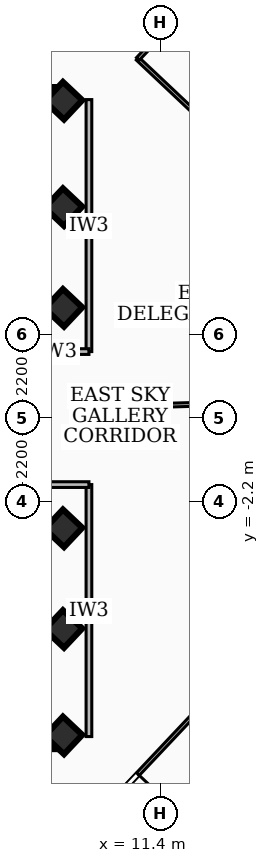
"""IFC4 building model, lengths in metres.
Left out: names, types, materials, properties, quantities, classifications, styles, units other than length and angle.
Written with IfcOpenShell. Run it as: python <this file> out.ifc"""

import sys

from ifc_helpers import new_model, si_unit, direction, frame, frame_2d, origin, origin_2d, place, context, subcontext, project, spatial, rectangle, extrude, element, fill, save


model = new_model("IFC4")
c1 = context("Model", 3, precision=1e-05, world=origin(), true_north=direction((0.0, 1.0)))
c2 = subcontext(c1, "Body", "Model", "MODEL_VIEW")
j1 = project(units=[si_unit("LENGTHUNIT", "METRE"), si_unit("PLANEANGLEUNIT", "RADIAN")], contexts=[c1])
p1 = place(None, origin())
s1 = spatial("IfcSite", under=j1, at=p1, CompositionType="ELEMENT")
p2 = place(p1, origin())
s2 = spatial("IfcBuilding", under=s1, at=p2, CompositionType="ELEMENT")
p3 = place(p2, frame((0.0, 0.0, 244.08)))
s3 = spatial("IfcBuildingStorey", under=s2, at=p3, CompositionType="ELEMENT", Elevation=244.08)
for number, where, z_axis, x_axis in (
    (1, (-8.78, 8.51, 0.0), (0.0, 0.0, 1.0), (1.0, 0.0, 0.0)),
    (2, (8.78, -8.51, 0.0), (0.0, 0.0, 1.0), (-1.0, 0.0, 0.0)),
):
    element("IfcWall", number, at=place(p3, frame(where, z_axis=z_axis, x_axis=x_axis)), inside=s3, PredefinedType="SHEAR", context=c2, shape_type="SweptSolid", body=[
        extrude(rectangle(XDim=17.56, YDim=0.4, at=frame_2d((8.78, 0.0))), origin(), (0.0, 0.0, 1.0), 3.16),
    ])
for number, where, z_axis, x_axis in (
    (3, (8.85, -5.55, 0.0), (0.0, 0.0, 1.0), (0.686, 0.728, 0.0)),
    (4, (8.85, -2.9, 0.0), (0.0, 0.0, 1.0), (0.686, 0.728, 0.0)),
    (5, (8.85, 2.9, 0.0), (0.0, 0.0, 1.0), (0.686, 0.728, 0.0)),
    (6, (8.85, 5.55, 0.0), (0.0, 0.0, 1.0), (0.686, 0.728, 0.0)),
    (7, (8.85, -8.35, 0.0), (0.0, 0.0, 1.0), (0.686, 0.728, 0.0)),
    (8, (8.85, 8.35, 0.0), (0.0, 0.0, 1.0), (0.686, 0.728, 0.0)),
):
    element("IfcColumn", number, at=place(p3, frame(where, z_axis=z_axis, x_axis=x_axis)), inside=s3, PredefinedType="COLUMN", context=c2, shape_type="SweptSolid", body=[
        extrude(rectangle(XDim=0.7, YDim=0.7, at=origin_2d()), origin(), (0.0, 0.0, 1.0), 3.42),
    ])
p4 = place(p3, frame((9.52, 1.75, 0.0), z_axis=(0.0, 0.0, 1.0), x_axis=(0.0, 1.0, 0.0)))
e9 = element("IfcWall", 9, at=p4, inside=s3, PredefinedType="PARTITIONING", context=c2, shape_type="SweptSolid", body=[
    extrude(rectangle(XDim=6.63, YDim=0.15, at=frame_2d((3.315, 0.0))), origin(), (0.0, 0.0, 1.0), 3.16),
])
p5 = place(p3, frame((7.85, 1.75, 0.0), z_axis=(0.0, 0.0, 1.0), x_axis=(1.0, 0.0, 0.0)))
e10 = element("IfcWall", 10, at=p5, inside=s3, PredefinedType="PARTITIONING", context=c2, shape_type="SweptSolid", body=[
    extrude(rectangle(XDim=1.67, YDim=0.15, at=frame_2d((0.835, 0.0))), origin(), (0.0, 0.0, 1.0), 2.39),
])
p6 = place(p3, frame((9.52, -8.38, 0.0), z_axis=(0.0, 0.0, 1.0), x_axis=(0.0, 1.0, 0.0)))
e11 = element("IfcWall", 11, at=p6, inside=s3, PredefinedType="PARTITIONING", context=c2, shape_type="SweptSolid", body=[
    extrude(rectangle(XDim=6.63, YDim=0.15, at=frame_2d((3.315, 0.0))), origin(), (0.0, 0.0, 1.0), 2.53),
])
p7 = place(p3, frame((7.85, -1.75, 0.0), z_axis=(0.0, 0.0, 1.0), x_axis=(1.0, 0.0, 0.0)))
e12 = element("IfcWall", 12, at=p7, inside=s3, PredefinedType="PARTITIONING", context=c2, shape_type="SweptSolid", body=[
    extrude(rectangle(XDim=1.67, YDim=0.15, at=frame_2d((0.835, 0.0))), origin(), (0.0, 0.0, 1.0), 2.39),
])
p8 = place(p3, frame((11.395, 0.334, 0.0), z_axis=(0.0, 0.0, 1.0), x_axis=(0.999571055306, 0.029286607775, 0.0)))
e13 = element("IfcWall", 13, at=p8, inside=s3, PredefinedType="PARTITIONING", context=c2, shape_type="SweptSolid", body=[
    extrude(rectangle(XDim=8.295, YDim=0.1, at=frame_2d((4.147, 0.0))), origin(), (0.0, 0.0, 1.0), 3.16),
])
p9 = place(p3, frame((16.585, 4.002, 0.0), z_axis=(0.0, 0.0, 1.0), x_axis=(-0.727485611578, 0.686122937196, 0.0)))
e14 = element("IfcWall", 14, at=p9, inside=s3, PredefinedType="PARTITIONING", context=c2, shape_type="SweptSolid", body=[
    extrude(rectangle(XDim=7.951, YDim=0.1, at=frame_2d((3.975, 0.0))), origin(), (0.0, 0.0, 1.0), 3.16),
])
p10 = place(p3, frame((10.808, 9.45, 0.0), z_axis=(0.0, 0.0, 1.0), x_axis=(0.686175284747, 0.727436236795, 0.0)))
e15 = element("IfcWall", 15, at=p10, inside=s3, PredefinedType="PARTITIONING", context=c2, shape_type="SweptSolid", body=[
    extrude(rectangle(XDim=2.16, YDim=0.1, at=frame_2d((1.08, 0.0))), origin(), (0.0, 0.0, 1.0), 3.16),
])
p11 = place(p10, frame((0.44, 0.0, 0.0)))
e16 = element("IfcOpeningElement", 16, at=p11, cuts=e15, PredefinedType="OPENING", context=c2, shape_type="SweptSolid", body=[
    extrude(rectangle(XDim=1.5, YDim=2.12, at=frame_2d((0.75, 1.06))), frame((0.0, 0.06, 0.0), z_axis=(0.0, -1.0, 0.0), x_axis=(1.0, 0.0, 0.0)), (0.0, 0.0, 1.0), 0.12),
])
p12 = place(p3, frame((6.75, 16.246, 0.0), z_axis=(0.0, 0.0, 1.0), x_axis=(0.727488049341, -0.686120352464, 0.0)))
e17 = element("IfcWall", 17, at=p12, inside=s3, PredefinedType="PARTITIONING", context=c2, shape_type="SweptSolid", body=[
    extrude(rectangle(XDim=12.47, YDim=0.1, at=frame_2d((6.235, 0.0))), origin(), (0.0, 0.0, 1.0), 2.53),
])
p13 = place(p12, frame((6.155, 0.0, 0.0)))
e18 = element("IfcOpeningElement", 18, at=p13, cuts=e17, PredefinedType="OPENING", context=c2, shape_type="SweptSolid", body=[
    extrude(rectangle(XDim=0.86, YDim=2.04, at=frame_2d((0.43, 1.02))), frame((0.0, 0.06, 0.0), z_axis=(0.0, -1.0, 0.0), x_axis=(1.0, 0.0, 0.0)), (0.0, 0.0, 1.0), 0.12),
])
p14 = place(p12, frame((4.955, 0.0, 0.0)))
e19 = element("IfcOpeningElement", 19, at=p14, cuts=e17, PredefinedType="OPENING", context=c2, shape_type="SweptSolid", body=[
    extrude(rectangle(XDim=0.86, YDim=2.04, at=frame_2d((0.43, 1.02))), frame((0.0, 0.06, 0.0), z_axis=(0.0, -1.0, 0.0), x_axis=(1.0, 0.0, 0.0)), (0.0, 0.0, 1.0), 0.12),
])
p15 = place(p3, frame((17.271, -2.514, 0.0), z_axis=(0.0, 0.0, 1.0), x_axis=(-0.686068145865, -0.727537283739, 0.0)))
e20 = element("IfcWall", 20, at=p15, inside=s3, PredefinedType="PARTITIONING", context=c2, shape_type="SweptSolid", body=[
    extrude(rectangle(XDim=20.04, YDim=0.1, at=frame_2d((10.02, 0.0))), origin(), (0.0, 0.0, 1.0), 2.53),
])
p16 = place(p15, frame((10.86, 0.0, 0.0)))
e21 = element("IfcOpeningElement", 21, at=p16, cuts=e20, PredefinedType="OPENING", context=c2, shape_type="SweptSolid", body=[
    extrude(rectangle(XDim=0.86, YDim=2.04, at=frame_2d((0.43, 1.02))), frame((0.0, 0.06, 0.0), z_axis=(0.0, -1.0, 0.0), x_axis=(1.0, 0.0, 0.0)), (0.0, 0.0, 1.0), 0.12),
])
p17 = place(p15, frame((9.42, 0.0, 0.0)))
e22 = element("IfcOpeningElement", 22, at=p17, cuts=e20, PredefinedType="OPENING", context=c2, shape_type="SweptSolid", body=[
    extrude(rectangle(XDim=0.86, YDim=2.04, at=frame_2d((0.43, 1.02))), frame((0.0, 0.06, 0.0), z_axis=(0.0, -1.0, 0.0), x_axis=(1.0, 0.0, 0.0)), (0.0, 0.0, 1.0), 0.12),
])
p18 = place(p17, origin())
e23 = element("IfcDoor", 23, at=p18, inside=s3, OperationType="SINGLE_SWING_LEFT", PredefinedType="DOOR", context=c2, shape_type="SweptSolid", body=[
    extrude(rectangle(XDim=0.86, YDim=2.04, at=frame_2d((0.43, 1.02))), frame((0.0, 0.025, 0.0), z_axis=(0.0, -1.0, 0.0), x_axis=(1.0, 0.0, 0.0)), (0.0, 0.0, 1.0), 0.05),
])
fill(e22, e23)
save(model, sys.argv[1])
